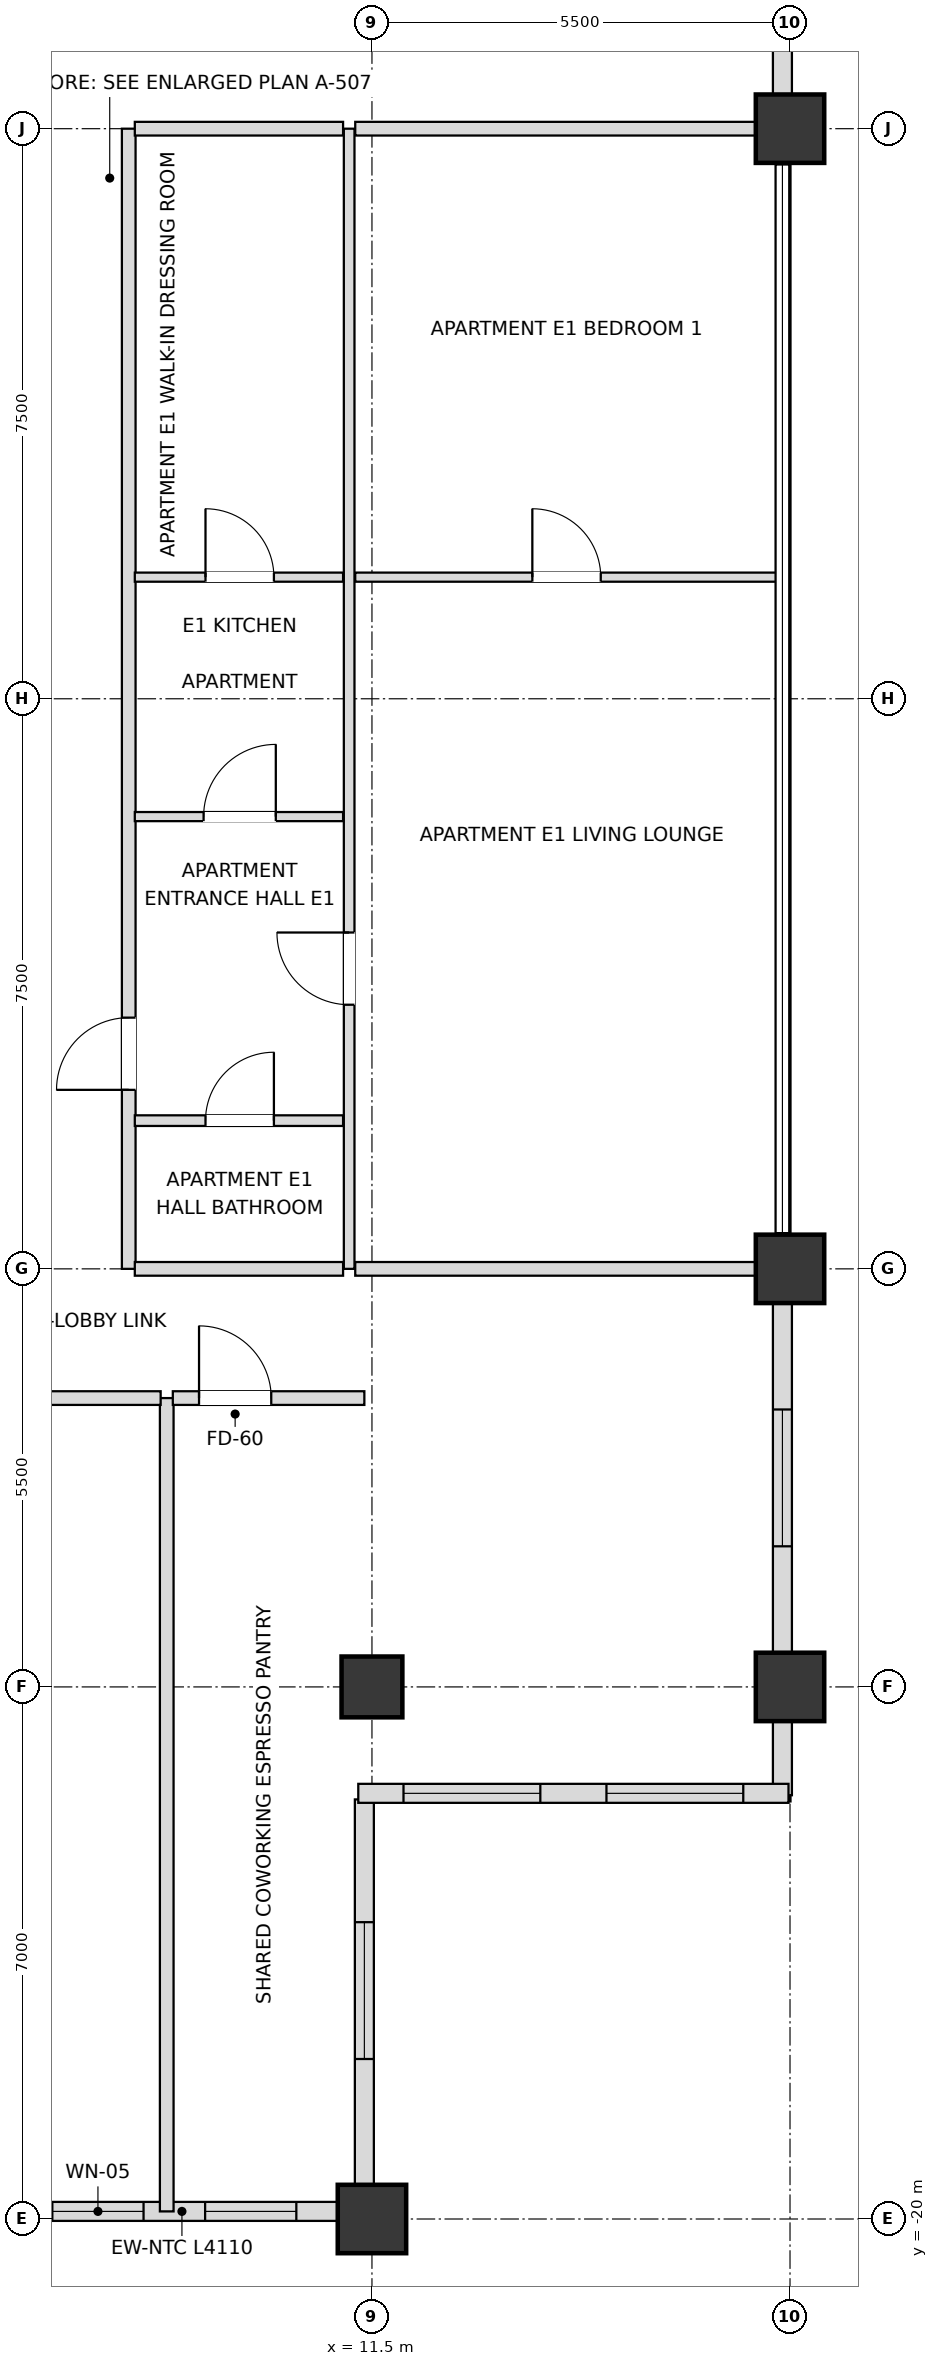
"""IFC4 building model, lengths in metres.
Left out: names, types, materials, properties, quantities, classifications, styles, units other than length and angle.
Written with IfcOpenShell. Run it as: python <this file> out.ifc"""

import sys

from ifc_helpers import new_model, si_unit, direction, frame, frame_2d, origin, origin_2d, place, context, subcontext, project, spatial, rectangle, extrude, element, fill, save


model = new_model("IFC4")
c1 = context("Model", 3, precision=1e-05, world=origin(), true_north=direction((0.0, 1.0)))
c2 = subcontext(c1, "Body", "Model", "MODEL_VIEW")
j1 = project(units=[si_unit("LENGTHUNIT", "METRE"), si_unit("PLANEANGLEUNIT", "RADIAN")], contexts=[c1])
p1 = place(None, origin())
s1 = spatial("IfcSite", under=j1, at=p1, CompositionType="ELEMENT")
p2 = place(p1, origin())
s2 = spatial("IfcBuilding", under=s1, at=p2, CompositionType="ELEMENT")
p3 = place(p2, frame((0.0, 0.0, 254.7)))
s3 = spatial("IfcBuildingStorey", under=s2, at=p3, CompositionType="ELEMENT", Elevation=254.7)
for number, where, z_axis, x_axis in (
    (1, (11.5, -20.0, 0.0), (0.0, 0.0, 1.0), (1.0, 0.0, 0.0)),
    (2, (17.0, -13.0, 0.0), (0.0, 0.0, 1.0), (1.0, 0.0, 0.0)),
    (3, (17.0, -7.5, 0.0), (0.0, 0.0, 1.0), (1.0, 0.0, 0.0)),
    (4, (17.0, 7.5, 0.0), (0.0, 0.0, 1.0), (1.0, 0.0, 0.0)),
):
    element("IfcColumn", number, at=place(p3, frame(where, z_axis=z_axis, x_axis=x_axis)), inside=s3, PredefinedType="USERDEFINED", context=c2, shape_type="SweptSolid", body=[
        extrude(rectangle(XDim=0.9, YDim=0.9, at=origin_2d()), origin(), (0.0, 0.0, 1.0), 3.6),
    ])
p4 = place(p3, frame((11.5, -13.0, 0.0), z_axis=(0.0, 0.0, 1.0), x_axis=(1.0, 0.0, 0.0)))
e5 = element("IfcColumn", 5, at=p4, inside=s3, PredefinedType="COLUMN", context=c2, shape_type="SweptSolid", body=[
    extrude(rectangle(XDim=0.8, YDim=0.8, at=origin_2d()), origin(), (0.0, 0.0, 1.0), 3.6),
])
p5 = place(p3, frame((6.945, -19.9, 0.0), z_axis=(0.0, 0.0, 1.0), x_axis=(1.0, 0.0, 0.0)))
e6 = element("IfcWall", 6, at=p5, inside=s3, PredefinedType="SOLIDWALL", context=c2, shape_type="SweptSolid", body=[
    extrude(rectangle(XDim=4.11, YDim=0.25, at=frame_2d((2.055, 0.0))), origin(), (0.0, 0.0, 1.0), 2.748),
])
p6 = place(p5, frame((0.35, 0.0, 0.72)))
e7 = element("IfcOpeningElement", 7, at=p6, cuts=e6, PredefinedType="OPENING", context=c2, shape_type="SweptSolid", body=[
    extrude(rectangle(XDim=1.2, YDim=1.68, at=frame_2d((0.6, 0.84))), frame((0.0, 0.135, 0.0), z_axis=(0.0, -1.0, 0.0), x_axis=(1.0, 0.0, 0.0)), (0.0, 0.0, 1.0), 0.27),
])
p7 = place(p5, frame((2.36, 0.0, 0.72)))
e8 = element("IfcOpeningElement", 8, at=p7, cuts=e6, PredefinedType="OPENING", context=c2, shape_type="SweptSolid", body=[
    extrude(rectangle(XDim=1.2, YDim=1.68, at=frame_2d((0.6, 0.84))), frame((0.0, 0.135, 0.0), z_axis=(0.0, -1.0, 0.0), x_axis=(1.0, 0.0, 0.0)), (0.0, 0.0, 1.0), 0.27),
])
p8 = place(p3, frame((16.9, -14.425, 0.0), z_axis=(0.0, 0.0, 1.0), x_axis=(0.0, 1.0, 0.0)))
e9 = element("IfcWall", 9, at=p8, inside=s3, PredefinedType="SOLIDWALL", context=c2, shape_type="SweptSolid", body=[
    extrude(rectangle(XDim=0.98, YDim=0.25, at=frame_2d((0.49, 0.0))), origin(), (0.0, 0.0, 1.0), 2.748),
])
p9 = place(p3, frame((16.9, -12.555, 0.0), z_axis=(0.0, 0.0, 1.0), x_axis=(0.0, 1.0, 0.0)))
e10 = element("IfcWall", 10, at=p9, inside=s3, PredefinedType="SOLIDWALL", context=c2, shape_type="SweptSolid", body=[
    extrude(rectangle(XDim=4.61, YDim=0.25, at=frame_2d((2.305, 0.0))), origin(), (0.0, 0.0, 1.0), 2.748),
])
p10 = place(p9, frame((1.405, 0.0, 0.72)))
e11 = element("IfcOpeningElement", 11, at=p10, cuts=e10, PredefinedType="OPENING", context=c2, shape_type="SweptSolid", body=[
    extrude(rectangle(XDim=1.8, YDim=1.68, at=frame_2d((0.9, 0.84))), frame((0.0, 0.135, 0.0), z_axis=(0.0, -1.0, 0.0), x_axis=(1.0, 0.0, 0.0)), (0.0, 0.0, 1.0), 0.27),
])
p11 = place(p3, frame((16.9, 7.945, 0.0), z_axis=(0.0, 0.0, 1.0), x_axis=(0.0, 1.0, 0.0)))
e12 = element("IfcWall", 12, at=p11, inside=s3, PredefinedType="SOLIDWALL", context=c2, shape_type="SweptSolid", body=[
    extrude(rectangle(XDim=4.61, YDim=0.25, at=frame_2d((2.305, 0.0))), origin(), (0.0, 0.0, 1.0), 2.748),
])
p12 = place(p11, frame((1.405, 0.0, 0.72)))
e13 = element("IfcOpeningElement", 13, at=p12, cuts=e12, PredefinedType="OPENING", context=c2, shape_type="SweptSolid", body=[
    extrude(rectangle(XDim=1.8, YDim=1.68, at=frame_2d((0.9, 0.84))), frame((0.0, 0.135, 0.0), z_axis=(0.0, -1.0, 0.0), x_axis=(1.0, 0.0, 0.0)), (0.0, 0.0, 1.0), 0.27),
])
p13 = place(p3, frame((11.4, -19.82, 0.0), z_axis=(0.0, 0.0, 1.0), x_axis=(0.0, 1.0, 0.0)))
e14 = element("IfcWall", 14, at=p13, inside=s3, PredefinedType="SOLIDWALL", context=c2, shape_type="SweptSolid", body=[
    extrude(rectangle(XDim=5.34, YDim=0.25, at=frame_2d((2.67, 0.0))), origin(), (0.0, 0.0, 1.0), 2.748),
])
p14 = place(p13, frame((1.925, 0.0, 0.72)))
e15 = element("IfcOpeningElement", 15, at=p14, cuts=e14, PredefinedType="OPENING", context=c2, shape_type="SweptSolid", body=[
    extrude(rectangle(XDim=1.8, YDim=1.68, at=frame_2d((0.9, 0.84))), frame((0.0, 0.135, 0.0), z_axis=(0.0, -1.0, 0.0), x_axis=(1.0, 0.0, 0.0)), (0.0, 0.0, 1.0), 0.27),
])
p15 = place(p3, frame((11.32, -14.4, 0.0), z_axis=(0.0, 0.0, 1.0), x_axis=(1.0, 0.0, 0.0)))
e16 = element("IfcWall", 16, at=p15, inside=s3, PredefinedType="SOLIDWALL", context=c2, shape_type="SweptSolid", body=[
    extrude(rectangle(XDim=5.66, YDim=0.25, at=frame_2d((2.83, 0.0))), origin(), (0.0, 0.0, 1.0), 2.748),
])
p16 = place(p15, frame((0.595, 0.0, 0.72)))
e17 = element("IfcOpeningElement", 17, at=p16, cuts=e16, PredefinedType="OPENING", context=c2, shape_type="SweptSolid", body=[
    extrude(rectangle(XDim=1.8, YDim=1.68, at=frame_2d((0.9, 0.84))), frame((0.0, 0.135, 0.0), z_axis=(0.0, -1.0, 0.0), x_axis=(1.0, 0.0, 0.0)), (0.0, 0.0, 1.0), 0.27),
])
p17 = place(p15, frame((3.265, 0.0, 0.72)))
e18 = element("IfcOpeningElement", 18, at=p17, cuts=e16, PredefinedType="OPENING", context=c2, shape_type="SweptSolid", body=[
    extrude(rectangle(XDim=1.8, YDim=1.68, at=frame_2d((0.9, 0.84))), frame((0.0, 0.135, 0.0), z_axis=(0.0, -1.0, 0.0), x_axis=(1.0, 0.0, 0.0)), (0.0, 0.0, 1.0), 0.27),
])
p18 = place(p3, frame((8.3, -7.5, 0.0), z_axis=(0.0, 0.0, 1.0), x_axis=(0.0, 1.0, 0.0)))
e19 = element("IfcWall", 19, at=p18, inside=s3, PredefinedType="PARTITIONING", context=c2, shape_type="SweptSolid", body=[
    extrude(rectangle(XDim=15.0, YDim=0.18, at=frame_2d((7.5, 0.0))), origin(), (0.0, 0.0, 1.0), 3.38),
])
p19 = place(p18, frame((2.355, 0.0, 0.0)))
e20 = element("IfcOpeningElement", 20, at=p19, cuts=e19, PredefinedType="OPENING", context=c2, shape_type="SweptSolid", body=[
    extrude(rectangle(XDim=0.95, YDim=2.15, at=frame_2d((0.475, 1.075))), frame((0.0, 0.1, 0.0), z_axis=(0.0, -1.0, 0.0), x_axis=(1.0, 0.0, 0.0)), (0.0, 0.0, 1.0), 0.2),
])
p20 = place(p3, frame((8.8, -19.9, 0.0), z_axis=(0.0, 0.0, 1.0), x_axis=(0.0, 1.0, 0.0)))
e21 = element("IfcWall", 21, at=p20, inside=s3, PredefinedType="PARTITIONING", context=c2, shape_type="SweptSolid", body=[
    extrude(rectangle(XDim=10.7, YDim=0.18, at=frame_2d((5.35, 0.0))), origin(), (0.0, 0.0, 1.0), 2.826),
])
p21 = place(p3, frame((11.2, -7.5, 0.0), z_axis=(0.0, 0.0, 1.0), x_axis=(0.0, 1.0, 0.0)))
e22 = element("IfcWall", 22, at=p21, inside=s3, PredefinedType="PARTITIONING", context=c2, shape_type="SweptSolid", body=[
    extrude(rectangle(XDim=15.0, YDim=0.14, at=frame_2d((7.5, 0.0))), origin(), (0.0, 0.0, 1.0), 3.38),
])
p22 = place(p21, frame((3.475, 0.0, 0.0)))
e23 = element("IfcOpeningElement", 23, at=p22, cuts=e22, PredefinedType="OPENING", context=c2, shape_type="SweptSolid", body=[
    extrude(rectangle(XDim=0.95, YDim=2.1, at=frame_2d((0.475, 1.05))), frame((0.0, 0.08, 0.0), z_axis=(0.0, -1.0, 0.0), x_axis=(1.0, 0.0, 0.0)), (0.0, 0.0, 1.0), 0.16),
])
p23 = place(p3, frame((-1.07, -9.2, 0.0), z_axis=(0.0, 0.0, 1.0), x_axis=(1.0, 0.0, 0.0)))
e24 = element("IfcWall", 24, at=p23, inside=s3, PredefinedType="PARTITIONING", context=c2, shape_type="SweptSolid", body=[
    extrude(rectangle(XDim=9.79, YDim=0.18, at=frame_2d((4.895, 0.0))), origin(), (0.0, 0.0, 1.0), 2.826),
])
p24 = place(p23, frame((4.435, 0.0, 0.0)))
e25 = element("IfcOpeningElement", 25, at=p24, cuts=e24, PredefinedType="OPENING", context=c2, shape_type="SweptSolid", body=[
    extrude(rectangle(XDim=0.95, YDim=2.15, at=frame_2d((0.475, 1.075))), frame((0.0, 0.1, 0.0), z_axis=(0.0, -1.0, 0.0), x_axis=(1.0, 0.0, 0.0)), (0.0, 0.0, 1.0), 0.2),
])
p25 = place(p3, frame((8.88, -9.2, 0.0), z_axis=(0.0, 0.0, 1.0), x_axis=(1.0, 0.0, 0.0)))
e26 = element("IfcWall", 26, at=p25, inside=s3, PredefinedType="PARTITIONING", context=c2, shape_type="SweptSolid", body=[
    extrude(rectangle(XDim=2.52, YDim=0.18, at=frame_2d((1.26, 0.0))), origin(), (0.0, 0.0, 1.0), 3.38),
])
p26 = place(p25, frame((0.345, 0.0, 0.0)))
e27 = element("IfcOpeningElement", 27, at=p26, cuts=e26, PredefinedType="OPENING", context=c2, shape_type="SweptSolid", body=[
    extrude(rectangle(XDim=0.95, YDim=2.15, at=frame_2d((0.475, 1.075))), frame((0.0, 0.1, 0.0), z_axis=(0.0, -1.0, 0.0), x_axis=(1.0, 0.0, 0.0)), (0.0, 0.0, 1.0), 0.2),
])
p27 = place(p3, frame((8.38, -7.5, 0.0), z_axis=(0.0, 0.0, 1.0), x_axis=(1.0, 0.0, 0.0)))
e28 = element("IfcWall", 28, at=p27, inside=s3, PredefinedType="PARTITIONING", context=c2, shape_type="SweptSolid", body=[
    extrude(rectangle(XDim=2.74, YDim=0.18, at=frame_2d((1.37, 0.0))), origin(), (0.0, 0.0, 1.0), 2.826),
])
p28 = place(p3, frame((11.28, -7.5, 0.0), z_axis=(0.0, 0.0, 1.0), x_axis=(1.0, 0.0, 0.0)))
e29 = element("IfcWall", 29, at=p28, inside=s3, PredefinedType="PARTITIONING", context=c2, shape_type="SweptSolid", body=[
    extrude(rectangle(XDim=5.62, YDim=0.18, at=frame_2d((2.81, 0.0))), origin(), (0.0, 0.0, 1.0), 2.826),
])
p29 = place(p3, frame((8.38, -5.55, 0.0), z_axis=(0.0, 0.0, 1.0), x_axis=(1.0, 0.0, 0.0)))
e30 = element("IfcWall", 30, at=p29, inside=s3, PredefinedType="PARTITIONING", context=c2, shape_type="SweptSolid", body=[
    extrude(rectangle(XDim=2.74, YDim=0.14, at=frame_2d((1.37, 0.0))), origin(), (0.0, 0.0, 1.0), 3.38),
])
p30 = place(p29, frame((0.93, 0.0, 0.0)))
e31 = element("IfcOpeningElement", 31, at=p30, cuts=e30, PredefinedType="OPENING", context=c2, shape_type="SweptSolid", body=[
    extrude(rectangle(XDim=0.9, YDim=2.1, at=frame_2d((0.45, 1.05))), frame((0.0, 0.08, 0.0), z_axis=(0.0, -1.0, 0.0), x_axis=(1.0, 0.0, 0.0)), (0.0, 0.0, 1.0), 0.16),
])
p31 = place(p3, frame((8.38, -1.55, 0.0), z_axis=(0.0, 0.0, 1.0), x_axis=(1.0, 0.0, 0.0)))
e32 = element("IfcWall", 32, at=p31, inside=s3, PredefinedType="PARTITIONING", context=c2, shape_type="SweptSolid", body=[
    extrude(rectangle(XDim=2.74, YDim=0.12, at=frame_2d((1.37, 0.0))), origin(), (0.0, 0.0, 1.0), 3.38),
])
p32 = place(p31, frame((0.905, 0.0, 0.0)))
e33 = element("IfcOpeningElement", 33, at=p32, cuts=e32, PredefinedType="OPENING", context=c2, shape_type="SweptSolid", body=[
    extrude(rectangle(XDim=0.95, YDim=2.1, at=frame_2d((0.475, 1.05))), frame((0.0, 0.07, 0.0), z_axis=(0.0, -1.0, 0.0), x_axis=(1.0, 0.0, 0.0)), (0.0, 0.0, 1.0), 0.14),
])
p33 = place(p3, frame((8.38, 1.6, 0.0), z_axis=(0.0, 0.0, 1.0), x_axis=(1.0, 0.0, 0.0)))
e34 = element("IfcWall", 34, at=p33, inside=s3, PredefinedType="PARTITIONING", context=c2, shape_type="SweptSolid", body=[
    extrude(rectangle(XDim=2.74, YDim=0.12, at=frame_2d((1.37, 0.0))), origin(), (0.0, 0.0, 1.0), 3.38),
])
p34 = place(p33, frame((0.93, 0.0, 0.0)))
e35 = element("IfcOpeningElement", 35, at=p34, cuts=e34, PredefinedType="OPENING", context=c2, shape_type="SweptSolid", body=[
    extrude(rectangle(XDim=0.9, YDim=2.1, at=frame_2d((0.45, 1.05))), frame((0.0, 0.07, 0.0), z_axis=(0.0, -1.0, 0.0), x_axis=(1.0, 0.0, 0.0)), (0.0, 0.0, 1.0), 0.14),
])
p35 = place(p3, frame((11.28, 1.6, 0.0), z_axis=(0.0, 0.0, 1.0), x_axis=(1.0, 0.0, 0.0)))
e36 = element("IfcWall", 36, at=p35, inside=s3, PredefinedType="PARTITIONING", context=c2, shape_type="SweptSolid", body=[
    extrude(rectangle(XDim=5.54, YDim=0.12, at=frame_2d((2.77, 0.0))), origin(), (0.0, 0.0, 1.0), 3.018),
])
p36 = place(p35, frame((2.33, 0.0, 0.0)))
e37 = element("IfcOpeningElement", 37, at=p36, cuts=e36, PredefinedType="OPENING", context=c2, shape_type="SweptSolid", body=[
    extrude(rectangle(XDim=0.9, YDim=2.1, at=frame_2d((0.45, 1.05))), frame((0.0, 0.07, 0.0), z_axis=(0.0, -1.0, 0.0), x_axis=(1.0, 0.0, 0.0)), (0.0, 0.0, 1.0), 0.14),
])
p37 = place(p3, frame((8.38, 7.5, 0.0), z_axis=(0.0, 0.0, 1.0), x_axis=(1.0, 0.0, 0.0)))
e38 = element("IfcWall", 38, at=p37, inside=s3, PredefinedType="PARTITIONING", context=c2, shape_type="SweptSolid", body=[
    extrude(rectangle(XDim=2.74, YDim=0.18, at=frame_2d((1.37, 0.0))), origin(), (0.0, 0.0, 1.0), 2.826),
])
p38 = place(p3, frame((11.28, 7.5, 0.0), z_axis=(0.0, 0.0, 1.0), x_axis=(1.0, 0.0, 0.0)))
e39 = element("IfcWall", 39, at=p38, inside=s3, PredefinedType="PARTITIONING", context=c2, shape_type="SweptSolid", body=[
    extrude(rectangle(XDim=5.62, YDim=0.18, at=frame_2d((2.81, 0.0))), origin(), (0.0, 0.0, 1.0), 2.826),
])
p39 = place(p6, origin())
e40 = element("IfcWindow", 40, at=p39, inside=s3, PartitioningType="SINGLE_PANEL", PredefinedType="WINDOW", context=c2, shape_type="SweptSolid", body=[
    extrude(rectangle(XDim=1.2, YDim=1.68, at=frame_2d((0.6, 0.84))), frame((0.0, 0.03, 0.0), z_axis=(0.0, -1.0, 0.0), x_axis=(1.0, 0.0, 0.0)), (0.0, 0.0, 1.0), 0.06),
])
fill(e7, e40)
p40 = place(p7, origin())
e41 = element("IfcWindow", 41, at=p40, inside=s3, PartitioningType="SINGLE_PANEL", PredefinedType="WINDOW", context=c2, shape_type="SweptSolid", body=[
    extrude(rectangle(XDim=1.2, YDim=1.68, at=frame_2d((0.6, 0.84))), frame((0.0, 0.03, 0.0), z_axis=(0.0, -1.0, 0.0), x_axis=(1.0, 0.0, 0.0)), (0.0, 0.0, 1.0), 0.06),
])
fill(e8, e41)
p41 = place(p10, origin())
e42 = element("IfcWindow", 42, at=p41, inside=s3, PartitioningType="SINGLE_PANEL", PredefinedType="WINDOW", context=c2, shape_type="SweptSolid", body=[
    extrude(rectangle(XDim=1.8, YDim=1.68, at=frame_2d((0.9, 0.84))), frame((0.0, 0.03, 0.0), z_axis=(0.0, -1.0, 0.0), x_axis=(1.0, 0.0, 0.0)), (0.0, 0.0, 1.0), 0.06),
])
fill(e11, e42)
p42 = place(p14, origin())
e43 = element("IfcWindow", 43, at=p42, inside=s3, PartitioningType="SINGLE_PANEL", PredefinedType="WINDOW", context=c2, shape_type="SweptSolid", body=[
    extrude(rectangle(XDim=1.8, YDim=1.68, at=frame_2d((0.9, 0.84))), frame((0.0, 0.03, 0.0), z_axis=(0.0, -1.0, 0.0), x_axis=(1.0, 0.0, 0.0)), (0.0, 0.0, 1.0), 0.06),
])
fill(e15, e43)
p43 = place(p16, origin())
e44 = element("IfcWindow", 44, at=p43, inside=s3, PartitioningType="SINGLE_PANEL", PredefinedType="WINDOW", context=c2, shape_type="SweptSolid", body=[
    extrude(rectangle(XDim=1.8, YDim=1.68, at=frame_2d((0.9, 0.84))), frame((0.0, 0.03, 0.0), z_axis=(0.0, -1.0, 0.0), x_axis=(1.0, 0.0, 0.0)), (0.0, 0.0, 1.0), 0.06),
])
fill(e17, e44)
p44 = place(p17, origin())
e45 = element("IfcWindow", 45, at=p44, inside=s3, PartitioningType="SINGLE_PANEL", PredefinedType="WINDOW", context=c2, shape_type="SweptSolid", body=[
    extrude(rectangle(XDim=1.8, YDim=1.68, at=frame_2d((0.9, 0.84))), frame((0.0, 0.03, 0.0), z_axis=(0.0, -1.0, 0.0), x_axis=(1.0, 0.0, 0.0)), (0.0, 0.0, 1.0), 0.06),
])
fill(e18, e45)
p45 = place(p26, origin())
e46 = element("IfcDoor", 46, at=p45, inside=s3, OperationType="SINGLE_SWING_LEFT", PredefinedType="DOOR", context=c2, shape_type="SweptSolid", body=[
    extrude(rectangle(XDim=0.95, YDim=2.15, at=frame_2d((0.475, 1.075))), frame((0.0, 0.025, 0.0), z_axis=(0.0, -1.0, 0.0), x_axis=(1.0, 0.0, 0.0)), (0.0, 0.0, 1.0), 0.05),
])
fill(e27, e46)
p46 = place(p30, origin())
e47 = element("IfcDoor", 47, at=p46, inside=s3, OperationType="SINGLE_SWING_RIGHT", PredefinedType="DOOR", context=c2, shape_type="SweptSolid", body=[
    extrude(rectangle(XDim=0.9, YDim=2.1, at=frame_2d((0.45, 1.05))), frame((0.0, 0.025, 0.0), z_axis=(0.0, -1.0, 0.0), x_axis=(1.0, 0.0, 0.0)), (0.0, 0.0, 1.0), 0.05),
])
fill(e31, e47)
p47 = place(p19, origin())
e48 = element("IfcDoor", 48, at=p47, inside=s3, OperationType="SINGLE_SWING_LEFT", PredefinedType="DOOR", context=c2, shape_type="SweptSolid", body=[
    extrude(rectangle(XDim=0.95, YDim=2.15, at=frame_2d((0.475, 1.075))), frame((0.0, 0.025, 0.0), z_axis=(0.0, -1.0, 0.0), x_axis=(1.0, 0.0, 0.0)), (0.0, 0.0, 1.0), 0.05),
])
fill(e20, e48)
p48 = place(p32, origin())
e49 = element("IfcDoor", 49, at=p48, inside=s3, OperationType="SINGLE_SWING_RIGHT", PredefinedType="DOOR", context=c2, shape_type="SweptSolid", body=[
    extrude(rectangle(XDim=0.95, YDim=2.1, at=frame_2d((0.475, 1.05))), frame((0.0, 0.025, 0.0), z_axis=(0.0, -1.0, 0.0), x_axis=(1.0, 0.0, 0.0)), (0.0, 0.0, 1.0), 0.05),
])
fill(e33, e49)
p49 = place(p34, origin())
e50 = element("IfcDoor", 50, at=p49, inside=s3, OperationType="SINGLE_SWING_LEFT", PredefinedType="DOOR", context=c2, shape_type="SweptSolid", body=[
    extrude(rectangle(XDim=0.9, YDim=2.1, at=frame_2d((0.45, 1.05))), frame((0.0, 0.025, 0.0), z_axis=(0.0, -1.0, 0.0), x_axis=(1.0, 0.0, 0.0)), (0.0, 0.0, 1.0), 0.05),
])
fill(e35, e50)
p50 = place(p22, origin())
e51 = element("IfcDoor", 51, at=p50, inside=s3, OperationType="SINGLE_SWING_RIGHT", PredefinedType="DOOR", context=c2, shape_type="SweptSolid", body=[
    extrude(rectangle(XDim=0.95, YDim=2.1, at=frame_2d((0.475, 1.05))), frame((0.0, 0.025, 0.0), z_axis=(0.0, -1.0, 0.0), x_axis=(1.0, 0.0, 0.0)), (0.0, 0.0, 1.0), 0.05),
])
fill(e23, e51)
p51 = place(p36, origin())
e52 = element("IfcDoor", 52, at=p51, inside=s3, OperationType="SINGLE_SWING_LEFT", PredefinedType="DOOR", context=c2, shape_type="SweptSolid", body=[
    extrude(rectangle(XDim=0.9, YDim=2.1, at=frame_2d((0.45, 1.05))), frame((0.0, 0.025, 0.0), z_axis=(0.0, -1.0, 0.0), x_axis=(1.0, 0.0, 0.0)), (0.0, 0.0, 1.0), 0.05),
])
fill(e37, e52)
save(model, sys.argv[1])
